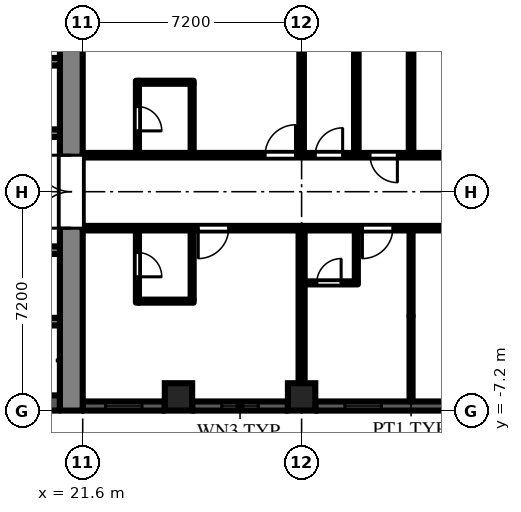
"""IFC4 building model, lengths in metres.
Left out: names, types, materials, properties, quantities, classifications, styles, units other than length and angle.
Written with IfcOpenShell. Run it as: python <this file> out.ifc"""

import sys

from ifc_helpers import new_model, si_unit, direction, frame, frame_2d, origin, origin_2d, place, context, subcontext, project, spatial, rectangle, extrude, element, fill, save


model = new_model("IFC4")
c1 = context("Model", 3, precision=1e-05, world=origin(), true_north=direction((0.0, 1.0)))
c2 = subcontext(c1, "Body", "Model", "MODEL_VIEW")
j1 = project(units=[si_unit("LENGTHUNIT", "METRE"), si_unit("PLANEANGLEUNIT", "RADIAN")], contexts=[c1])
p1 = place(None, origin())
s1 = spatial("IfcSite", under=j1, at=p1, CompositionType="ELEMENT")
p2 = place(p1, origin())
s2 = spatial("IfcBuilding", under=s1, at=p2, CompositionType="ELEMENT")
p3 = place(p2, frame((0.0, 0.0, 53.7)))
s3 = spatial("IfcBuildingStorey", under=s2, at=p3, CompositionType="ELEMENT", Elevation=53.7)
for number, where, z_axis, x_axis in (
    (1, (24.75, -6.75, 0.0), (0.0, 0.0, 1.0), (1.0, 0.0, 0.0)),
    (2, (28.8, -6.75, 0.0), (0.0, 0.0, 1.0), (1.0, 0.0, 0.0)),
):
    element("IfcColumn", number, at=place(p3, frame(where, z_axis=z_axis, x_axis=x_axis)), inside=s3, PredefinedType="COLUMN", context=c2, shape_type="SweptSolid", body=[
        extrude(rectangle(XDim=0.9, YDim=0.9, at=origin_2d()), origin(), (0.0, 0.0, 1.0), 3.0),
    ])
p4 = place(p3, frame((21.6, -7.05, 0.0), z_axis=(0.0, 0.0, 1.0), x_axis=(1.0, 0.0, 0.0)))
e3 = element("IfcWall", 3, at=p4, inside=s3, PredefinedType="SOLIDWALL", context=c2, shape_type="SweptSolid", body=[
    extrude(rectangle(XDim=2.7, YDim=0.3, at=frame_2d((1.35, 0.0))), origin(), (0.0, 0.0, 1.0), 2.1),
])
p5 = place(p4, frame((0.75, 0.0, 0.2)))
e4 = element("IfcOpeningElement", 4, at=p5, cuts=e3, PredefinedType="OPENING", context=c2, shape_type="SweptSolid", body=[
    extrude(rectangle(XDim=1.2, YDim=1.85, at=frame_2d((0.6, 0.925))), frame((0.0, 0.16, 0.0), z_axis=(0.0, -1.0, 0.0), x_axis=(1.0, 0.0, 0.0)), (0.0, 0.0, 1.0), 0.32),
])
p6 = place(p3, frame((25.2, -7.05, 0.0), z_axis=(0.0, 0.0, 1.0), x_axis=(1.0, 0.0, 0.0)))
e5 = element("IfcWall", 5, at=p6, inside=s3, PredefinedType="SOLIDWALL", context=c2, shape_type="SweptSolid", body=[
    extrude(rectangle(XDim=3.15, YDim=0.3, at=frame_2d((1.575, 0.0))), origin(), (0.0, 0.0, 1.0), 2.1),
])
p7 = place(p6, frame((0.975, 0.0, 0.2)))
e6 = element("IfcOpeningElement", 6, at=p7, cuts=e5, PredefinedType="OPENING", context=c2, shape_type="SweptSolid", body=[
    extrude(rectangle(XDim=1.2, YDim=1.85, at=frame_2d((0.6, 0.925))), frame((0.0, 0.16, 0.0), z_axis=(0.0, -1.0, 0.0), x_axis=(1.0, 0.0, 0.0)), (0.0, 0.0, 1.0), 0.32),
])
p8 = place(p3, frame((29.25, -7.05, 0.0), z_axis=(0.0, 0.0, 1.0), x_axis=(1.0, 0.0, 0.0)))
e7 = element("IfcWall", 7, at=p8, inside=s3, PredefinedType="SOLIDWALL", context=c2, shape_type="SweptSolid", body=[
    extrude(rectangle(XDim=6.3, YDim=0.3, at=frame_2d((3.15, 0.0))), origin(), (0.0, 0.0, 1.0), 2.1),
])
p9 = place(p8, frame((0.975, 0.0, 0.2)))
e8 = element("IfcOpeningElement", 8, at=p9, cuts=e7, PredefinedType="OPENING", context=c2, shape_type="SweptSolid", body=[
    extrude(rectangle(XDim=1.2, YDim=1.85, at=frame_2d((0.6, 0.925))), frame((0.0, 0.16, 0.0), z_axis=(0.0, -1.0, 0.0), x_axis=(1.0, 0.0, 0.0)), (0.0, 0.0, 1.0), 0.32),
])
p10 = place(p3, frame((21.225, -7.2, 0.0), z_axis=(0.0, 0.0, 1.0), x_axis=(0.0, 1.0, 0.0)))
e9 = element("IfcWall", 9, at=p10, inside=s3, PredefinedType="SHEAR", context=c2, shape_type="SweptSolid", body=[
    extrude(rectangle(XDim=14.4, YDim=0.75, at=frame_2d((7.2, 0.0))), origin(), (0.0, 0.0, 1.0), 2.575),
])
p11 = place(p10, frame((6.0, 0.0, 0.0)))
e10 = element("IfcOpeningElement", 10, at=p11, cuts=e9, PredefinedType="OPENING", context=c2, shape_type="SweptSolid", body=[
    extrude(rectangle(XDim=2.4, YDim=2.2, at=frame_2d((1.2, 1.1))), frame((0.0, 0.385, 0.0), z_axis=(0.0, -1.0, 0.0), x_axis=(1.0, 0.0, 0.0)), (0.0, 0.0, 1.0), 0.77),
])
p12 = place(p3, frame((7.9, 1.925, 0.0), z_axis=(0.0, 0.0, 1.0), x_axis=(1.0, 0.0, 0.0)))
e11 = element("IfcWall", 11, at=p12, inside=s3, PredefinedType="SHEAR", context=c2, shape_type="SweptSolid", body=[
    extrude(rectangle(XDim=12.95, YDim=0.25, at=frame_2d((6.475, 0.0))), origin(), (0.0, 0.0, 1.0), 2.575),
])
p13 = place(p12, frame((0.525, 0.0, 0.0)))
e12 = element("IfcOpeningElement", 12, at=p13, cuts=e11, PredefinedType="OPENING", context=c2, shape_type="SweptSolid", body=[
    extrude(rectangle(XDim=0.9, YDim=2.1, at=frame_2d((0.45, 1.05))), frame((0.0, 0.135, 0.0), z_axis=(0.0, -1.0, 0.0), x_axis=(1.0, 0.0, 0.0)), (0.0, 0.0, 1.0), 0.27),
])
p14 = place(p12, frame((2.625, 0.0, 0.0)))
e13 = element("IfcOpeningElement", 13, at=p14, cuts=e11, PredefinedType="OPENING", context=c2, shape_type="SweptSolid", body=[
    extrude(rectangle(XDim=1.1, YDim=2.1, at=frame_2d((0.55, 1.05))), frame((0.0, 0.135, 0.0), z_axis=(0.0, -1.0, 0.0), x_axis=(1.0, 0.0, 0.0)), (0.0, 0.0, 1.0), 0.27),
])
p15 = place(p12, frame((6.025, 0.0, 0.0)))
e14 = element("IfcOpeningElement", 14, at=p15, cuts=e11, PredefinedType="OPENING", context=c2, shape_type="SweptSolid", body=[
    extrude(rectangle(XDim=0.9, YDim=2.1, at=frame_2d((0.45, 1.05))), frame((0.0, 0.135, 0.0), z_axis=(0.0, -1.0, 0.0), x_axis=(1.0, 0.0, 0.0)), (0.0, 0.0, 1.0), 0.27),
])
p16 = place(p12, frame((9.325, 0.0, 0.0)))
e15 = element("IfcOpeningElement", 15, at=p16, cuts=e11, PredefinedType="OPENING", context=c2, shape_type="SweptSolid", body=[
    extrude(rectangle(XDim=0.9, YDim=2.1, at=frame_2d((0.45, 1.05))), frame((0.0, 0.135, 0.0), z_axis=(0.0, -1.0, 0.0), x_axis=(1.0, 0.0, 0.0)), (0.0, 0.0, 1.0), 0.27),
])
p17 = place(p3, frame((12.3, 4.275, 0.0), z_axis=(0.0, 0.0, 1.0), x_axis=(1.0, 0.0, 0.0)))
e16 = element("IfcWall", 16, at=p17, inside=s3, PredefinedType="SHEAR", context=c2, shape_type="SweptSolid", body=[
    extrude(rectangle(XDim=8.55, YDim=0.25, at=frame_2d((4.275, 0.0))), origin(), (0.0, 0.0, 1.0), 2.575),
])
p18 = place(p3, frame((7.9, -6.95, 0.0), z_axis=(0.0, 0.0, 1.0), x_axis=(1.0, 0.0, 0.0)))
e17 = element("IfcWall", 17, at=p18, inside=s3, PredefinedType="SHEAR", context=c2, shape_type="SweptSolid", body=[
    extrude(rectangle(XDim=12.95, YDim=0.5, at=frame_2d((6.475, 0.0))), origin(), (0.0, 0.0, 1.0), 2.575),
])
p19 = place(p3, frame((7.9, -1.925, 0.0), z_axis=(0.0, 0.0, 1.0), x_axis=(1.0, 0.0, 0.0)))
e18 = element("IfcWall", 18, at=p19, inside=s3, PredefinedType="SHEAR", context=c2, shape_type="SweptSolid", body=[
    extrude(rectangle(XDim=12.95, YDim=0.25, at=frame_2d((6.475, 0.0))), origin(), (0.0, 0.0, 1.0), 2.575),
])
p20 = place(p19, frame((4.825, 0.0, 0.0)))
e19 = element("IfcOpeningElement", 19, at=p20, cuts=e18, PredefinedType="OPENING", context=c2, shape_type="SweptSolid", body=[
    extrude(rectangle(XDim=1.1, YDim=2.1, at=frame_2d((0.55, 1.05))), frame((0.0, 0.135, 0.0), z_axis=(0.0, -1.0, 0.0), x_axis=(1.0, 0.0, 0.0)), (0.0, 0.0, 1.0), 0.27),
])
p21 = place(p19, frame((7.025, 0.0, 0.0)))
e20 = element("IfcOpeningElement", 20, at=p21, cuts=e18, PredefinedType="OPENING", context=c2, shape_type="SweptSolid", body=[
    extrude(rectangle(XDim=1.1, YDim=2.1, at=frame_2d((0.55, 1.05))), frame((0.0, 0.135, 0.0), z_axis=(0.0, -1.0, 0.0), x_axis=(1.0, 0.0, 0.0)), (0.0, 0.0, 1.0), 0.27),
])
p22 = place(p19, frame((9.225, 0.0, 0.0)))
e21 = element("IfcOpeningElement", 21, at=p22, cuts=e18, PredefinedType="OPENING", context=c2, shape_type="SweptSolid", body=[
    extrude(rectangle(XDim=1.1, YDim=2.1, at=frame_2d((0.55, 1.05))), frame((0.0, 0.135, 0.0), z_axis=(0.0, -1.0, 0.0), x_axis=(1.0, 0.0, 0.0)), (0.0, 0.0, 1.0), 0.27),
])
p23 = place(p19, frame((0.525, 0.0, 0.0)))
e22 = element("IfcOpeningElement", 22, at=p23, cuts=e18, PredefinedType="OPENING", context=c2, shape_type="SweptSolid", body=[
    extrude(rectangle(XDim=0.9, YDim=2.1, at=frame_2d((0.45, 1.05))), frame((0.0, 0.135, 0.0), z_axis=(0.0, -1.0, 0.0), x_axis=(1.0, 0.0, 0.0)), (0.0, 0.0, 1.0), 0.27),
])
p24 = place(p19, frame((2.625, 0.0, 0.0)))
e23 = element("IfcOpeningElement", 23, at=p24, cuts=e18, PredefinedType="OPENING", context=c2, shape_type="SweptSolid", body=[
    extrude(rectangle(XDim=1.1, YDim=2.1, at=frame_2d((0.55, 1.05))), frame((0.0, 0.135, 0.0), z_axis=(0.0, -1.0, 0.0), x_axis=(1.0, 0.0, 0.0)), (0.0, 0.0, 1.0), 0.27),
])
p25 = place(p3, frame((12.3, -4.275, 0.0), z_axis=(0.0, 0.0, 1.0), x_axis=(1.0, 0.0, 0.0)))
e24 = element("IfcWall", 24, at=p25, inside=s3, PredefinedType="SHEAR", context=c2, shape_type="SweptSolid", body=[
    extrude(rectangle(XDim=8.55, YDim=0.25, at=frame_2d((4.275, 0.0))), origin(), (0.0, 0.0, 1.0), 2.575),
])
p26 = place(p3, frame((21.6, -1.2, 0.0), z_axis=(0.0, 0.0, 1.0), x_axis=(1.0, 0.0, 0.0)))
e25 = element("IfcWall", 25, at=p26, inside=s3, PredefinedType="PARTITIONING", context=c2, shape_type="SweptSolid", body=[
    extrude(rectangle(XDim=14.9, YDim=0.15, at=frame_2d((7.45, 0.0))), origin(), (0.0, 0.0, 1.0), 2.575),
])
p27 = place(p26, frame((3.8, 0.0, 0.0)))
e26 = element("IfcOpeningElement", 26, at=p27, cuts=e25, PredefinedType="OPENING", context=c2, shape_type="SweptSolid", body=[
    extrude(rectangle(XDim=1.0, YDim=2.1, at=frame_2d((0.5, 1.05))), frame((0.0, 0.085, 0.0), z_axis=(0.0, -1.0, 0.0), x_axis=(1.0, 0.0, 0.0)), (0.0, 0.0, 1.0), 0.17),
])
p28 = place(p26, frame((9.2, 0.0, 0.0)))
e27 = element("IfcOpeningElement", 27, at=p28, cuts=e25, PredefinedType="OPENING", context=c2, shape_type="SweptSolid", body=[
    extrude(rectangle(XDim=1.0, YDim=2.1, at=frame_2d((0.5, 1.05))), frame((0.0, 0.085, 0.0), z_axis=(0.0, -1.0, 0.0), x_axis=(1.0, 0.0, 0.0)), (0.0, 0.0, 1.0), 0.17),
])
p29 = place(p26, frame((11.95, 0.0, 0.0)))
e28 = element("IfcOpeningElement", 28, at=p29, cuts=e25, PredefinedType="OPENING", context=c2, shape_type="SweptSolid", body=[
    extrude(rectangle(XDim=1.8, YDim=2.1, at=frame_2d((0.9, 1.05))), frame((0.0, 0.085, 0.0), z_axis=(0.0, -1.0, 0.0), x_axis=(1.0, 0.0, 0.0)), (0.0, 0.0, 1.0), 0.17),
])
p30 = place(p3, frame((21.6, 1.2, 0.0), z_axis=(0.0, 0.0, 1.0), x_axis=(1.0, 0.0, 0.0)))
e29 = element("IfcWall", 29, at=p30, inside=s3, PredefinedType="PARTITIONING", context=c2, shape_type="SweptSolid", body=[
    extrude(rectangle(XDim=14.9, YDim=0.15, at=frame_2d((7.45, 0.0))), origin(), (0.0, 0.0, 1.0), 2.575),
])
p31 = place(p30, frame((6.0, 0.0, 0.0)))
e30 = element("IfcOpeningElement", 30, at=p31, cuts=e29, PredefinedType="OPENING", context=c2, shape_type="SweptSolid", body=[
    extrude(rectangle(XDim=1.0, YDim=2.1, at=frame_2d((0.5, 1.05))), frame((0.0, 0.085, 0.0), z_axis=(0.0, -1.0, 0.0), x_axis=(1.0, 0.0, 0.0)), (0.0, 0.0, 1.0), 0.17),
])
p32 = place(p30, frame((7.65, 0.0, 0.0)))
e31 = element("IfcOpeningElement", 31, at=p32, cuts=e29, PredefinedType="OPENING", context=c2, shape_type="SweptSolid", body=[
    extrude(rectangle(XDim=0.9, YDim=2.1, at=frame_2d((0.45, 1.05))), frame((0.0, 0.085, 0.0), z_axis=(0.0, -1.0, 0.0), x_axis=(1.0, 0.0, 0.0)), (0.0, 0.0, 1.0), 0.17),
])
p33 = place(p30, frame((9.45, 0.0, 0.0)))
e32 = element("IfcOpeningElement", 32, at=p33, cuts=e29, PredefinedType="OPENING", context=c2, shape_type="SweptSolid", body=[
    extrude(rectangle(XDim=0.9, YDim=2.1, at=frame_2d((0.45, 1.05))), frame((0.0, 0.085, 0.0), z_axis=(0.0, -1.0, 0.0), x_axis=(1.0, 0.0, 0.0)), (0.0, 0.0, 1.0), 0.17),
])
p34 = place(p30, frame((11.95, 0.0, 0.0)))
e33 = element("IfcOpeningElement", 33, at=p34, cuts=e29, PredefinedType="OPENING", context=c2, shape_type="SweptSolid", body=[
    extrude(rectangle(XDim=1.8, YDim=2.1, at=frame_2d((0.9, 1.05))), frame((0.0, 0.085, 0.0), z_axis=(0.0, -1.0, 0.0), x_axis=(1.0, 0.0, 0.0)), (0.0, 0.0, 1.0), 0.17),
])
p35 = place(p3, frame((23.4, -3.65, 0.0), z_axis=(0.0, 0.0, 1.0), x_axis=(0.0, 1.0, 0.0)))
e34 = element("IfcWall", 34, at=p35, inside=s3, PredefinedType="PARTITIONING", context=c2, shape_type="SweptSolid", body=[
    extrude(rectangle(XDim=2.375, YDim=0.1, at=frame_2d((1.188, 0.0))), origin(), (0.0, 0.0, 1.0), 2.575),
])
p36 = place(p35, frame((0.85, 0.0, 0.0)))
e35 = element("IfcOpeningElement", 35, at=p36, cuts=e34, PredefinedType="OPENING", context=c2, shape_type="SweptSolid", body=[
    extrude(rectangle(XDim=0.8, YDim=2.1, at=frame_2d((0.4, 1.05))), frame((0.0, 0.06, 0.0), z_axis=(0.0, -1.0, 0.0), x_axis=(1.0, 0.0, 0.0)), (0.0, 0.0, 1.0), 0.12),
])
p37 = place(p3, frame((23.45, -3.6, 0.0), z_axis=(0.0, 0.0, 1.0), x_axis=(1.0, 0.0, 0.0)))
e36 = element("IfcWall", 36, at=p37, inside=s3, PredefinedType="PARTITIONING", context=c2, shape_type="SweptSolid", body=[
    extrude(rectangle(XDim=1.8, YDim=0.1, at=frame_2d((0.9, 0.0))), origin(), (0.0, 0.0, 1.0), 2.575),
])
p38 = place(p3, frame((23.4, 1.275, 0.0), z_axis=(0.0, 0.0, 1.0), x_axis=(0.0, 1.0, 0.0)))
e37 = element("IfcWall", 37, at=p38, inside=s3, PredefinedType="PARTITIONING", context=c2, shape_type="SweptSolid", body=[
    extrude(rectangle(XDim=2.375, YDim=0.1, at=frame_2d((1.188, 0.0))), origin(), (0.0, 0.0, 1.0), 2.575),
])
p39 = place(p38, frame((0.725, 0.0, 0.0)))
e38 = element("IfcOpeningElement", 38, at=p39, cuts=e37, PredefinedType="OPENING", context=c2, shape_type="SweptSolid", body=[
    extrude(rectangle(XDim=0.8, YDim=2.1, at=frame_2d((0.4, 1.05))), frame((0.0, 0.06, 0.0), z_axis=(0.0, -1.0, 0.0), x_axis=(1.0, 0.0, 0.0)), (0.0, 0.0, 1.0), 0.12),
])
p40 = place(p3, frame((23.45, 3.6, 0.0), z_axis=(0.0, 0.0, 1.0), x_axis=(1.0, 0.0, 0.0)))
e39 = element("IfcWall", 39, at=p40, inside=s3, PredefinedType="PARTITIONING", context=c2, shape_type="SweptSolid", body=[
    extrude(rectangle(XDim=1.8, YDim=0.1, at=frame_2d((0.9, 0.0))), origin(), (0.0, 0.0, 1.0), 2.575),
])
for number, where, z_axis, x_axis in (
    (40, (25.2, -3.55, 0.0), (0.0, 0.0, 1.0), (0.0, 1.0, 0.0)),
    (41, (25.2, 1.275, 0.0), (0.0, 0.0, 1.0), (0.0, 1.0, 0.0)),
):
    element("IfcWall", number, at=place(p3, frame(where, z_axis=z_axis, x_axis=x_axis)), inside=s3, PredefinedType="PARTITIONING", context=c2, shape_type="SweptSolid", body=[
        extrude(rectangle(XDim=2.275, YDim=0.1, at=frame_2d((1.138, 0.0))), origin(), (0.0, 0.0, 1.0), 2.575),
    ])
p41 = place(p3, frame((28.8, -6.9, 0.0), z_axis=(0.0, 0.0, 1.0), x_axis=(0.0, 1.0, 0.0)))
e42 = element("IfcWall", 42, at=p41, inside=s3, PredefinedType="PARTITIONING", context=c2, shape_type="SweptSolid", body=[
    extrude(rectangle(XDim=5.625, YDim=0.2, at=frame_2d((2.812, 0.0))), origin(), (0.0, 0.0, 1.0), 2.575),
])
p42 = place(p3, frame((28.9, -3.0, 0.0), z_axis=(0.0, 0.0, 1.0), x_axis=(1.0, 0.0, 0.0)))
e43 = element("IfcWall", 43, at=p42, inside=s3, PredefinedType="PARTITIONING", context=c2, shape_type="SweptSolid", body=[
    extrude(rectangle(XDim=1.75, YDim=0.1, at=frame_2d((0.875, 0.0))), origin(), (0.0, 0.0, 1.0), 2.575),
])
p43 = place(p42, frame((0.4, 0.0, 0.0)))
e44 = element("IfcOpeningElement", 44, at=p43, cuts=e43, PredefinedType="OPENING", context=c2, shape_type="SweptSolid", body=[
    extrude(rectangle(XDim=0.8, YDim=2.1, at=frame_2d((0.4, 1.05))), frame((0.0, 0.06, 0.0), z_axis=(0.0, -1.0, 0.0), x_axis=(1.0, 0.0, 0.0)), (0.0, 0.0, 1.0), 0.12),
])
p44 = place(p3, frame((28.8, 1.275, 0.0), z_axis=(0.0, 0.0, 1.0), x_axis=(0.0, 1.0, 0.0)))
e45 = element("IfcWall", 45, at=p44, inside=s3, PredefinedType="PARTITIONING", context=c2, shape_type="SweptSolid", body=[
    extrude(rectangle(XDim=5.625, YDim=0.15, at=frame_2d((2.812, 0.0))), origin(), (0.0, 0.0, 1.0), 2.575),
])
p45 = place(p3, frame((30.6, -2.95, 0.0), z_axis=(0.0, 0.0, 1.0), x_axis=(0.0, 1.0, 0.0)))
e46 = element("IfcWall", 46, at=p45, inside=s3, PredefinedType="PARTITIONING", context=c2, shape_type="SweptSolid", body=[
    extrude(rectangle(XDim=1.675, YDim=0.1, at=frame_2d((0.837, 0.0))), origin(), (0.0, 0.0, 1.0), 2.575),
])
p46 = place(p3, frame((30.6, 1.275, 0.0), z_axis=(0.0, 0.0, 1.0), x_axis=(0.0, 1.0, 0.0)))
e47 = element("IfcWall", 47, at=p46, inside=s3, PredefinedType="PARTITIONING", context=c2, shape_type="SweptSolid", body=[
    extrude(rectangle(XDim=5.625, YDim=0.15, at=frame_2d((2.812, 0.0))), origin(), (0.0, 0.0, 1.0), 2.575),
])
p47 = place(p3, frame((32.4, -6.9, 0.0), z_axis=(0.0, 0.0, 1.0), x_axis=(0.0, 1.0, 0.0)))
e48 = element("IfcWall", 48, at=p47, inside=s3, PredefinedType="PARTITIONING", context=c2, shape_type="SweptSolid", body=[
    extrude(rectangle(XDim=5.625, YDim=0.1, at=frame_2d((2.812, 0.0))), origin(), (0.0, 0.0, 1.0), 2.575),
])
p48 = place(p3, frame((32.4, 1.275, 0.0), z_axis=(0.0, 0.0, 1.0), x_axis=(0.0, 1.0, 0.0)))
e49 = element("IfcWall", 49, at=p48, inside=s3, PredefinedType="PARTITIONING", context=c2, shape_type="SweptSolid", body=[
    extrude(rectangle(XDim=5.625, YDim=0.15, at=frame_2d((2.812, 0.0))), origin(), (0.0, 0.0, 1.0), 2.575),
])
p49 = place(p5, origin())
e50 = element("IfcWindow", 50, at=p49, inside=s3, PartitioningType="SINGLE_PANEL", PredefinedType="WINDOW", context=c2, shape_type="SweptSolid", body=[
    extrude(rectangle(XDim=1.2, YDim=1.85, at=frame_2d((0.6, 0.925))), frame((0.0, 0.03, 0.0), z_axis=(0.0, -1.0, 0.0), x_axis=(1.0, 0.0, 0.0)), (0.0, 0.0, 1.0), 0.06),
])
fill(e4, e50)
p50 = place(p7, origin())
e51 = element("IfcWindow", 51, at=p50, inside=s3, PartitioningType="SINGLE_PANEL", PredefinedType="WINDOW", context=c2, shape_type="SweptSolid", body=[
    extrude(rectangle(XDim=1.2, YDim=1.85, at=frame_2d((0.6, 0.925))), frame((0.0, 0.03, 0.0), z_axis=(0.0, -1.0, 0.0), x_axis=(1.0, 0.0, 0.0)), (0.0, 0.0, 1.0), 0.06),
])
fill(e6, e51)
p51 = place(p9, origin())
e52 = element("IfcWindow", 52, at=p51, inside=s3, PartitioningType="SINGLE_PANEL", PredefinedType="WINDOW", context=c2, shape_type="SweptSolid", body=[
    extrude(rectangle(XDim=1.2, YDim=1.85, at=frame_2d((0.6, 0.925))), frame((0.0, 0.03, 0.0), z_axis=(0.0, -1.0, 0.0), x_axis=(1.0, 0.0, 0.0)), (0.0, 0.0, 1.0), 0.06),
])
fill(e8, e52)
p52 = place(p11, origin())
e53 = element("IfcDoor", 53, at=p52, inside=s3, OperationType="DOUBLE_DOOR_DOUBLE_SWING", PredefinedType="DOOR", context=c2, shape_type="SweptSolid", body=[
    extrude(rectangle(XDim=2.4, YDim=2.2, at=frame_2d((1.2, 1.1))), frame((0.0, 0.025, 0.0), z_axis=(0.0, -1.0, 0.0), x_axis=(1.0, 0.0, 0.0)), (0.0, 0.0, 1.0), 0.05),
])
fill(e10, e53)
p53 = place(p39, frame((0.8, 0.0, 0.0), z_axis=(0.0, 0.0, 1.0), x_axis=(-1.0, 0.0, 0.0)))
e54 = element("IfcDoor", 54, at=p53, inside=s3, OperationType="SINGLE_SWING_RIGHT", PredefinedType="DOOR", context=c2, shape_type="SweptSolid", body=[
    extrude(rectangle(XDim=0.8, YDim=2.1, at=frame_2d((0.4, 1.05))), frame((0.0, 0.025, 0.0), z_axis=(0.0, -1.0, 0.0), x_axis=(1.0, 0.0, 0.0)), (0.0, 0.0, 1.0), 0.05),
])
fill(e38, e54)
p54 = place(p31, origin())
e55 = element("IfcDoor", 55, at=p54, inside=s3, OperationType="SINGLE_SWING_RIGHT", PredefinedType="DOOR", context=c2, shape_type="SweptSolid", body=[
    extrude(rectangle(XDim=1.0, YDim=2.1, at=frame_2d((0.5, 1.05))), frame((0.0, 0.025, 0.0), z_axis=(0.0, -1.0, 0.0), x_axis=(1.0, 0.0, 0.0)), (0.0, 0.0, 1.0), 0.05),
])
fill(e30, e55)
p55 = place(p32, origin())
e56 = element("IfcDoor", 56, at=p55, inside=s3, OperationType="SINGLE_SWING_RIGHT", PredefinedType="DOOR", context=c2, shape_type="SweptSolid", body=[
    extrude(rectangle(XDim=0.9, YDim=2.1, at=frame_2d((0.45, 1.05))), frame((0.0, 0.025, 0.0), z_axis=(0.0, -1.0, 0.0), x_axis=(1.0, 0.0, 0.0)), (0.0, 0.0, 1.0), 0.05),
])
fill(e31, e56)
p56 = place(p33, frame((0.9, 0.0, 0.0), z_axis=(0.0, 0.0, 1.0), x_axis=(-1.0, 0.0, 0.0)))
e57 = element("IfcDoor", 57, at=p56, inside=s3, OperationType="SINGLE_SWING_LEFT", PredefinedType="DOOR", context=c2, shape_type="SweptSolid", body=[
    extrude(rectangle(XDim=0.9, YDim=2.1, at=frame_2d((0.45, 1.05))), frame((0.0, 0.025, 0.0), z_axis=(0.0, -1.0, 0.0), x_axis=(1.0, 0.0, 0.0)), (0.0, 0.0, 1.0), 0.05),
])
fill(e32, e57)
p57 = place(p36, frame((0.8, 0.0, 0.0), z_axis=(0.0, 0.0, 1.0), x_axis=(-1.0, 0.0, 0.0)))
e58 = element("IfcDoor", 58, at=p57, inside=s3, OperationType="SINGLE_SWING_RIGHT", PredefinedType="DOOR", context=c2, shape_type="SweptSolid", body=[
    extrude(rectangle(XDim=0.8, YDim=2.1, at=frame_2d((0.4, 1.05))), frame((0.0, 0.025, 0.0), z_axis=(0.0, -1.0, 0.0), x_axis=(1.0, 0.0, 0.0)), (0.0, 0.0, 1.0), 0.05),
])
fill(e35, e58)
p58 = place(p27, frame((1.0, 0.0, 0.0), z_axis=(0.0, 0.0, 1.0), x_axis=(-1.0, 0.0, 0.0)))
e59 = element("IfcDoor", 59, at=p58, inside=s3, OperationType="SINGLE_SWING_RIGHT", PredefinedType="DOOR", context=c2, shape_type="SweptSolid", body=[
    extrude(rectangle(XDim=1.0, YDim=2.1, at=frame_2d((0.5, 1.05))), frame((0.0, 0.025, 0.0), z_axis=(0.0, -1.0, 0.0), x_axis=(1.0, 0.0, 0.0)), (0.0, 0.0, 1.0), 0.05),
])
fill(e26, e59)
p59 = place(p43, origin())
e60 = element("IfcDoor", 60, at=p59, inside=s3, OperationType="SINGLE_SWING_RIGHT", PredefinedType="DOOR", context=c2, shape_type="SweptSolid", body=[
    extrude(rectangle(XDim=0.8, YDim=2.1, at=frame_2d((0.4, 1.05))), frame((0.0, 0.025, 0.0), z_axis=(0.0, -1.0, 0.0), x_axis=(1.0, 0.0, 0.0)), (0.0, 0.0, 1.0), 0.05),
])
fill(e44, e60)
p60 = place(p28, frame((1.0, 0.0, 0.0), z_axis=(0.0, 0.0, 1.0), x_axis=(-1.0, 0.0, 0.0)))
e61 = element("IfcDoor", 61, at=p60, inside=s3, OperationType="SINGLE_SWING_RIGHT", PredefinedType="DOOR", context=c2, shape_type="SweptSolid", body=[
    extrude(rectangle(XDim=1.0, YDim=2.1, at=frame_2d((0.5, 1.05))), frame((0.0, 0.025, 0.0), z_axis=(0.0, -1.0, 0.0), x_axis=(1.0, 0.0, 0.0)), (0.0, 0.0, 1.0), 0.05),
])
fill(e27, e61)
save(model, sys.argv[1])
